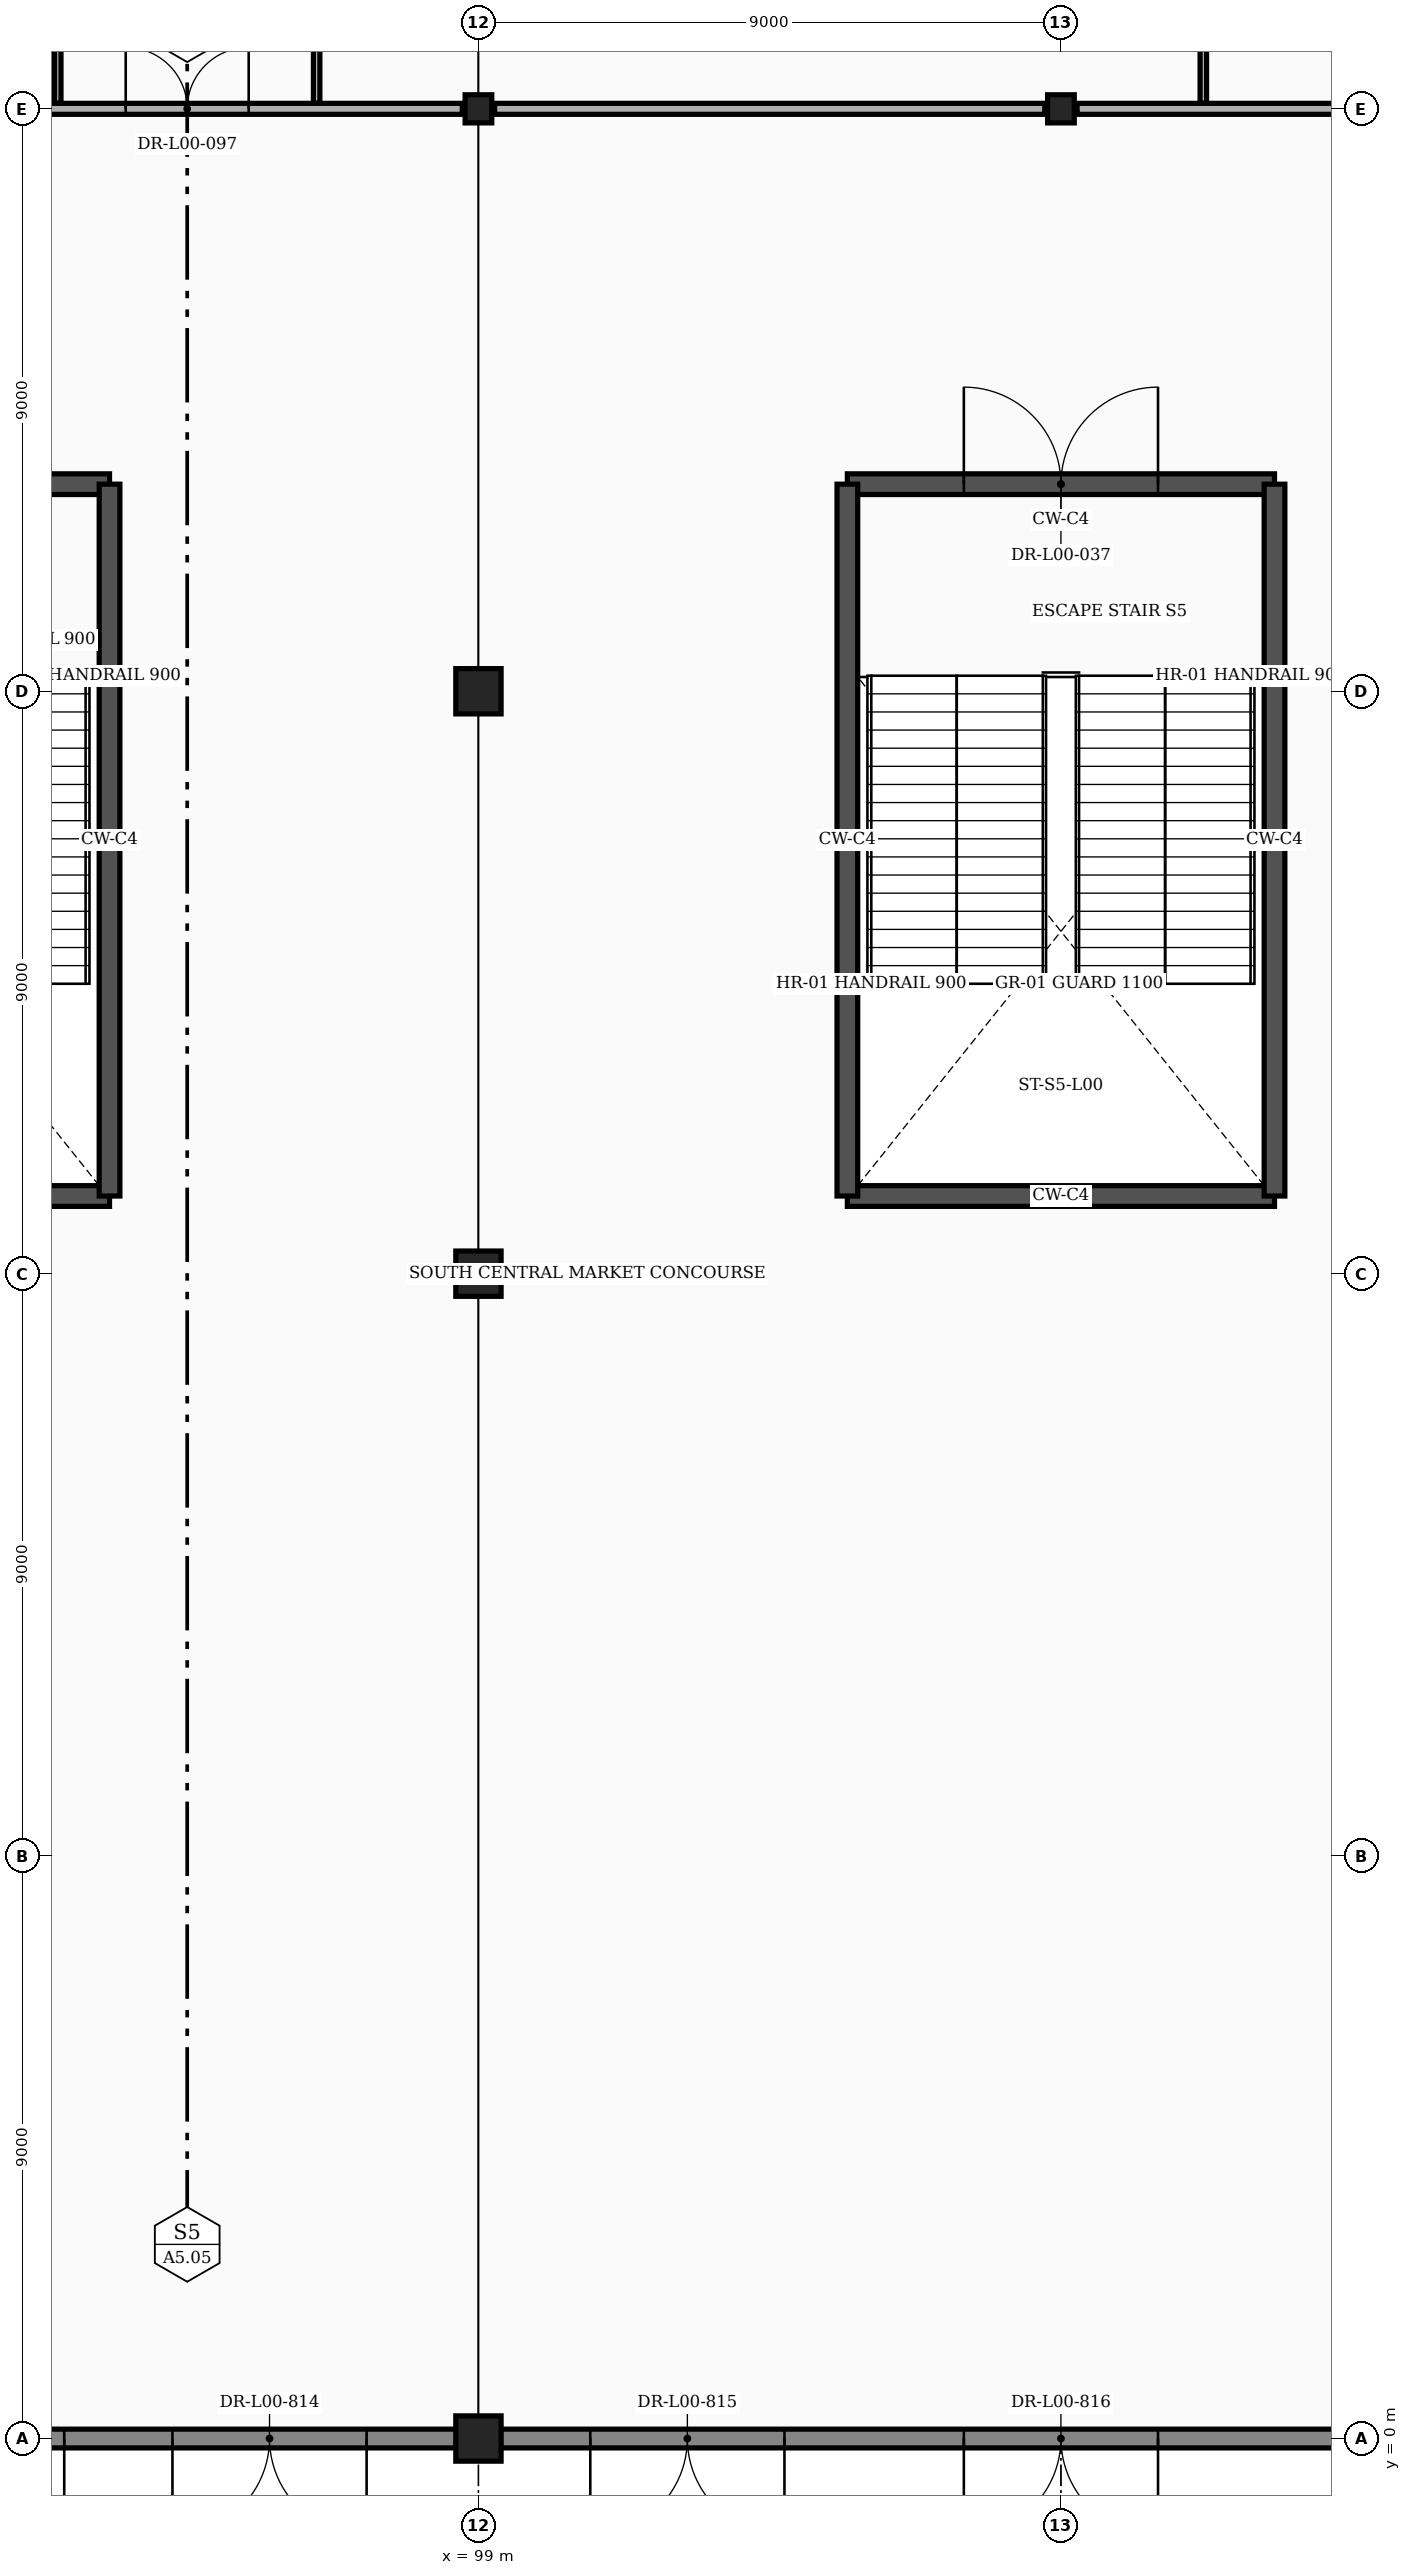
"""IFC4 building model, lengths in metres.
Left out: names, types, materials, properties, quantities, classifications, styles, units other than length and angle.
Written with IfcOpenShell. Run it as: python <this file> out.ifc"""

import sys

from ifc_helpers import new_model, si_unit, direction, frame, frame_2d, origin, origin_2d, place, context, subcontext, project, spatial, rectangle, i_section, extrude, element, fill, save


model = new_model("IFC4")
c1 = context("Model", 3, precision=1e-05, world=origin(), true_north=direction((0.0, 1.0)))
c2 = subcontext(c1, "Body", "Model", "MODEL_VIEW")
j1 = project(units=[si_unit("LENGTHUNIT", "METRE"), si_unit("PLANEANGLEUNIT", "RADIAN")], contexts=[c1])
p1 = place(None, origin())
s1 = spatial("IfcSite", under=j1, at=p1, CompositionType="ELEMENT")
p2 = place(p1, origin())
s2 = spatial("IfcBuilding", under=s1, at=p2, CompositionType="ELEMENT")
p3 = place(p2, origin())
s3 = spatial("IfcBuildingStorey", under=s2, at=p3, CompositionType="ELEMENT", Elevation=0.0)
for number, where, z_axis, x_axis in (
    (1, (99.0, 0.0, 0.0), (0.0, 0.0, 1.0), (1.0, 0.0, 0.0)),
    (2, (99.0, 18.0, 0.0), (0.0, 0.0, 1.0), (1.0, 0.0, 0.0)),
    (3, (99.0, 27.0, 0.0), (0.0, 0.0, 1.0), (1.0, 0.0, 0.0)),
):
    element("IfcColumn", number, at=place(p3, frame(where, z_axis=z_axis, x_axis=x_axis)), inside=s3, PredefinedType="COLUMN", context=c2, shape_type="SweptSolid", body=[
        extrude(rectangle(XDim=0.7, YDim=0.7, at=origin_2d()), origin(), (0.0, 0.0, 1.0), 6.0),
    ])
for number, where, z_axis, x_axis in (
    (4, (99.0, 36.0, 0.0), (0.0, 0.0, 1.0), (1.0, 0.0, 0.0)),
    (5, (108.0, 36.0, 0.0), (0.0, 0.0, 1.0), (1.0, 0.0, 0.0)),
):
    element("IfcColumn", number, at=place(p3, frame(where, z_axis=z_axis, x_axis=x_axis)), inside=s3, PredefinedType="COLUMN", context=c2, shape_type="SweptSolid", body=[
        extrude(i_section(OverallWidth=0.412, OverallDepth=0.435, WebThickness=0.036, FlangeThickness=0.058, at=origin_2d()), origin(), (0.0, 0.0, 1.0), 6.0),
    ])
p4 = place(p3, frame((81.342, 0.0, 0.0), z_axis=(0.0, 0.0, 1.0), x_axis=(1.0, 0.0, 0.0)))
e6 = element("IfcWall", 6, at=p4, inside=s3, PredefinedType="STANDARD", context=c2, shape_type="SweptSolid", body=[
    extrude(rectangle(XDim=17.316, YDim=0.29, at=frame_2d((8.658, 0.0))), origin(), (0.0, 0.0, 1.0), 4.988),
])
p5 = place(p4, frame((4.736, 0.0, 0.0)))
e7 = element("IfcOpeningElement", 7, at=p5, cuts=e6, PredefinedType="OPENING", context=c2, shape_type="SweptSolid", body=[
    extrude(rectangle(XDim=3.0, YDim=2.4, at=frame_2d((1.5, 1.2))), frame((0.0, 0.157, 0.0), z_axis=(0.0, -1.0, 0.0), x_axis=(1.0, 0.0, 0.0)), (0.0, 0.0, 1.0), 0.314),
])
p6 = place(p4, frame((8.258, 0.0, 0.0)))
e8 = element("IfcOpeningElement", 8, at=p6, cuts=e6, PredefinedType="OPENING", context=c2, shape_type="SweptSolid", body=[
    extrude(rectangle(XDim=3.0, YDim=2.4, at=frame_2d((1.5, 1.2))), frame((0.0, 0.157, 0.0), z_axis=(0.0, -1.0, 0.0), x_axis=(1.0, 0.0, 0.0)), (0.0, 0.0, 1.0), 0.314),
])
p7 = place(p4, frame((12.93, 0.0, 0.0)))
e9 = element("IfcOpeningElement", 9, at=p7, cuts=e6, PredefinedType="OPENING", context=c2, shape_type="SweptSolid", body=[
    extrude(rectangle(XDim=3.0, YDim=2.4, at=frame_2d((1.5, 1.2))), frame((0.0, 0.157, 0.0), z_axis=(0.0, -1.0, 0.0), x_axis=(1.0, 0.0, 0.0)), (0.0, 0.0, 1.0), 0.314),
])
p8 = place(p3, frame((99.342, 0.0, 0.0), z_axis=(0.0, 0.0, 1.0), x_axis=(1.0, 0.0, 0.0)))
e10 = element("IfcWall", 10, at=p8, inside=s3, PredefinedType="STANDARD", context=c2, shape_type="SweptSolid", body=[
    extrude(rectangle(XDim=17.316, YDim=0.29, at=frame_2d((8.658, 0.0))), origin(), (0.0, 0.0, 1.0), 4.988),
])
p9 = place(p8, frame((1.386, 0.0, 0.0)))
e11 = element("IfcOpeningElement", 11, at=p9, cuts=e10, PredefinedType="OPENING", context=c2, shape_type="SweptSolid", body=[
    extrude(rectangle(XDim=3.0, YDim=2.4, at=frame_2d((1.5, 1.2))), frame((0.0, 0.157, 0.0), z_axis=(0.0, -1.0, 0.0), x_axis=(1.0, 0.0, 0.0)), (0.0, 0.0, 1.0), 0.314),
])
p10 = place(p8, frame((7.158, 0.0, 0.0)))
e12 = element("IfcOpeningElement", 12, at=p10, cuts=e10, PredefinedType="OPENING", context=c2, shape_type="SweptSolid", body=[
    extrude(rectangle(XDim=3.0, YDim=2.4, at=frame_2d((1.5, 1.2))), frame((0.0, 0.157, 0.0), z_axis=(0.0, -1.0, 0.0), x_axis=(1.0, 0.0, 0.0)), (0.0, 0.0, 1.0), 0.314),
])
p11 = place(p3, frame((86.7, 19.2, 0.0), z_axis=(0.0, 0.0, 1.0), x_axis=(1.0, 0.0, 0.0)))
e13 = element("IfcWall", 13, at=p11, inside=s3, PredefinedType="SHEAR", context=c2, shape_type="SweptSolid", body=[
    extrude(rectangle(XDim=6.6, YDim=0.32, at=frame_2d((3.3, 0.0))), origin(), (0.0, 0.0, 1.0), 5.75),
])
p12 = place(p3, frame((86.7, 30.2, 0.0), z_axis=(0.0, 0.0, 1.0), x_axis=(1.0, 0.0, 0.0)))
e14 = element("IfcWall", 14, at=p12, inside=s3, PredefinedType="SHEAR", context=c2, shape_type="SweptSolid", body=[
    extrude(rectangle(XDim=6.6, YDim=0.32, at=frame_2d((3.3, 0.0))), origin(), (0.0, 0.0, 1.0), 5.75),
])
p13 = place(p12, frame((1.8, 0.0, 0.0)))
e15 = element("IfcOpeningElement", 15, at=p13, cuts=e14, PredefinedType="OPENING", context=c2, shape_type="SweptSolid", body=[
    extrude(rectangle(XDim=3.0, YDim=2.25, at=frame_2d((1.5, 1.125))), frame((0.0, 0.172, 0.0), z_axis=(0.0, -1.0, 0.0), x_axis=(1.0, 0.0, 0.0)), (0.0, 0.0, 1.0), 0.344),
])
p14 = place(p3, frame((93.3, 19.2, 0.0), z_axis=(0.0, 0.0, 1.0), x_axis=(0.0, 1.0, 0.0)))
e16 = element("IfcWall", 16, at=p14, inside=s3, PredefinedType="SHEAR", context=c2, shape_type="SweptSolid", body=[
    extrude(rectangle(XDim=11.0, YDim=0.32, at=frame_2d((5.5, 0.0))), origin(), (0.0, 0.0, 1.0), 5.75),
])
p15 = place(p3, frame((104.7, 19.2, 0.0), z_axis=(0.0, 0.0, 1.0), x_axis=(1.0, 0.0, 0.0)))
e17 = element("IfcWall", 17, at=p15, inside=s3, PredefinedType="SHEAR", context=c2, shape_type="SweptSolid", body=[
    extrude(rectangle(XDim=6.6, YDim=0.32, at=frame_2d((3.3, 0.0))), origin(), (0.0, 0.0, 1.0), 5.75),
])
p16 = place(p3, frame((104.7, 30.2, 0.0), z_axis=(0.0, 0.0, 1.0), x_axis=(1.0, 0.0, 0.0)))
e18 = element("IfcWall", 18, at=p16, inside=s3, PredefinedType="SHEAR", context=c2, shape_type="SweptSolid", body=[
    extrude(rectangle(XDim=6.6, YDim=0.32, at=frame_2d((3.3, 0.0))), origin(), (0.0, 0.0, 1.0), 5.75),
])
p17 = place(p16, frame((1.8, 0.0, 0.0)))
e19 = element("IfcOpeningElement", 19, at=p17, cuts=e18, PredefinedType="OPENING", context=c2, shape_type="SweptSolid", body=[
    extrude(rectangle(XDim=3.0, YDim=2.25, at=frame_2d((1.5, 1.125))), frame((0.0, 0.172, 0.0), z_axis=(0.0, -1.0, 0.0), x_axis=(1.0, 0.0, 0.0)), (0.0, 0.0, 1.0), 0.344),
])
for number, where, z_axis, x_axis in (
    (20, (104.7, 19.2, 0.0), (0.0, 0.0, 1.0), (0.0, 1.0, 0.0)),
    (21, (111.3, 19.2, 0.0), (0.0, 0.0, 1.0), (0.0, 1.0, 0.0)),
):
    element("IfcWall", number, at=place(p3, frame(where, z_axis=z_axis, x_axis=x_axis)), inside=s3, PredefinedType="SHEAR", context=c2, shape_type="SweptSolid", body=[
        extrude(rectangle(XDim=11.0, YDim=0.32, at=frame_2d((5.5, 0.0))), origin(), (0.0, 0.0, 1.0), 5.75),
    ])
for number, where, z_axis, x_axis in (
    (22, (92.5, 36.085, 0.0), (0.0, 0.0, 1.0), (0.0, 1.0, 0.0)),
    (23, (96.5, 36.085, 0.0), (0.0, 0.0, 1.0), (0.0, 1.0, 0.0)),
):
    element("IfcWall", number, at=place(p3, frame(where, z_axis=z_axis, x_axis=x_axis)), inside=s3, PredefinedType="PARTITIONING", context=c2, shape_type="SweptSolid", body=[
        extrude(rectangle(XDim=9.915, YDim=0.1, at=frame_2d((4.958, 0.0))), origin(), (0.0, 0.0, 1.0), 4.2),
    ])
p18 = place(p3, frame((110.2, 36.085, 0.0), z_axis=(0.0, 0.0, 1.0), x_axis=(0.0, 1.0, 0.0)))
e24 = element("IfcWall", 24, at=p18, inside=s3, PredefinedType="PARTITIONING", context=c2, shape_type="SweptSolid", body=[
    extrude(rectangle(XDim=9.865, YDim=0.1, at=frame_2d((4.933, 0.0))), origin(), (0.0, 0.0, 1.0), 4.2),
])
p19 = place(p3, frame((90.25, 36.0, 0.0), z_axis=(0.0, 0.0, 1.0), x_axis=(1.0, 0.0, 0.0)))
e25 = element("IfcWall", 25, at=p19, inside=s3, PredefinedType="PARTITIONING", context=c2, shape_type="SweptSolid", body=[
    extrude(rectangle(XDim=8.5, YDim=0.17, at=frame_2d((4.25, 0.0))), origin(), (0.0, 0.0, 1.0), 5.138),
])
p20 = place(p19, frame((3.3, 0.0, 0.0)))
e26 = element("IfcOpeningElement", 26, at=p20, cuts=e25, PredefinedType="OPENING", context=c2, shape_type="SweptSolid", body=[
    extrude(rectangle(XDim=1.9, YDim=2.35, at=frame_2d((0.95, 1.175))), frame((0.0, 0.097, 0.0), z_axis=(0.0, -1.0, 0.0), x_axis=(1.0, 0.0, 0.0)), (0.0, 0.0, 1.0), 0.194),
])
for number, where, z_axis, x_axis in (
    (27, (99.25, 36.0, 0.0), (0.0, 0.0, 1.0), (1.0, 0.0, 0.0)),
    (28, (108.25, 36.0, 0.0), (0.0, 0.0, 1.0), (1.0, 0.0, 0.0)),
):
    element("IfcWall", number, at=place(p3, frame(where, z_axis=z_axis, x_axis=x_axis)), inside=s3, PredefinedType="PARTITIONING", context=c2, shape_type="SweptSolid", body=[
        extrude(rectangle(XDim=8.5, YDim=0.17, at=frame_2d((4.25, 0.0))), origin(), (0.0, 0.0, 1.0), 5.138),
    ])
p21 = place(p6, frame((3.0, 0.0, 0.0), z_axis=(0.0, 0.0, 1.0), x_axis=(-1.0, 0.0, 0.0)))
e29 = element("IfcDoor", 29, at=p21, inside=s3, OperationType="DOUBLE_DOOR_SINGLE_SWING", PredefinedType="DOOR", context=c2, shape_type="SweptSolid", body=[
    extrude(rectangle(XDim=3.0, YDim=2.4, at=frame_2d((1.5, 1.2))), frame((0.0, 0.025, 0.0), z_axis=(0.0, -1.0, 0.0), x_axis=(1.0, 0.0, 0.0)), (0.0, 0.0, 1.0), 0.05),
])
fill(e8, e29)
p22 = place(p7, frame((3.0, 0.0, 0.0), z_axis=(0.0, 0.0, 1.0), x_axis=(-1.0, 0.0, 0.0)))
e30 = element("IfcDoor", 30, at=p22, inside=s3, OperationType="DOUBLE_DOOR_SINGLE_SWING", PredefinedType="DOOR", context=c2, shape_type="SweptSolid", body=[
    extrude(rectangle(XDim=3.0, YDim=2.4, at=frame_2d((1.5, 1.2))), frame((0.0, 0.025, 0.0), z_axis=(0.0, -1.0, 0.0), x_axis=(1.0, 0.0, 0.0)), (0.0, 0.0, 1.0), 0.05),
])
fill(e9, e30)
p23 = place(p9, frame((3.0, 0.0, 0.0), z_axis=(0.0, 0.0, 1.0), x_axis=(-1.0, 0.0, 0.0)))
e31 = element("IfcDoor", 31, at=p23, inside=s3, OperationType="DOUBLE_DOOR_SINGLE_SWING", PredefinedType="DOOR", context=c2, shape_type="SweptSolid", body=[
    extrude(rectangle(XDim=3.0, YDim=2.4, at=frame_2d((1.5, 1.2))), frame((0.0, 0.025, 0.0), z_axis=(0.0, -1.0, 0.0), x_axis=(1.0, 0.0, 0.0)), (0.0, 0.0, 1.0), 0.05),
])
fill(e11, e31)
p24 = place(p10, frame((3.0, 0.0, 0.0), z_axis=(0.0, 0.0, 1.0), x_axis=(-1.0, 0.0, 0.0)))
e32 = element("IfcDoor", 32, at=p24, inside=s3, OperationType="DOUBLE_DOOR_SINGLE_SWING", PredefinedType="DOOR", context=c2, shape_type="SweptSolid", body=[
    extrude(rectangle(XDim=3.0, YDim=2.4, at=frame_2d((1.5, 1.2))), frame((0.0, 0.025, 0.0), z_axis=(0.0, -1.0, 0.0), x_axis=(1.0, 0.0, 0.0)), (0.0, 0.0, 1.0), 0.05),
])
fill(e12, e32)
p25 = place(p17, origin())
e33 = element("IfcDoor", 33, at=p25, inside=s3, OperationType="DOUBLE_DOOR_SINGLE_SWING", PredefinedType="DOOR", context=c2, shape_type="SweptSolid", body=[
    extrude(rectangle(XDim=3.0, YDim=2.25, at=frame_2d((1.5, 1.125))), frame((0.0, 0.025, 0.0), z_axis=(0.0, -1.0, 0.0), x_axis=(1.0, 0.0, 0.0)), (0.0, 0.0, 1.0), 0.05),
])
fill(e19, e33)
p26 = place(p20, origin())
e34 = element("IfcDoor", 34, at=p26, inside=s3, OperationType="DOUBLE_DOOR_SINGLE_SWING", PredefinedType="DOOR", context=c2, shape_type="SweptSolid", body=[
    extrude(rectangle(XDim=1.9, YDim=2.35, at=frame_2d((0.95, 1.175))), frame((0.0, 0.025, 0.0), z_axis=(0.0, -1.0, 0.0), x_axis=(1.0, 0.0, 0.0)), (0.0, 0.0, 1.0), 0.05),
])
fill(e26, e34)
save(model, sys.argv[1])
